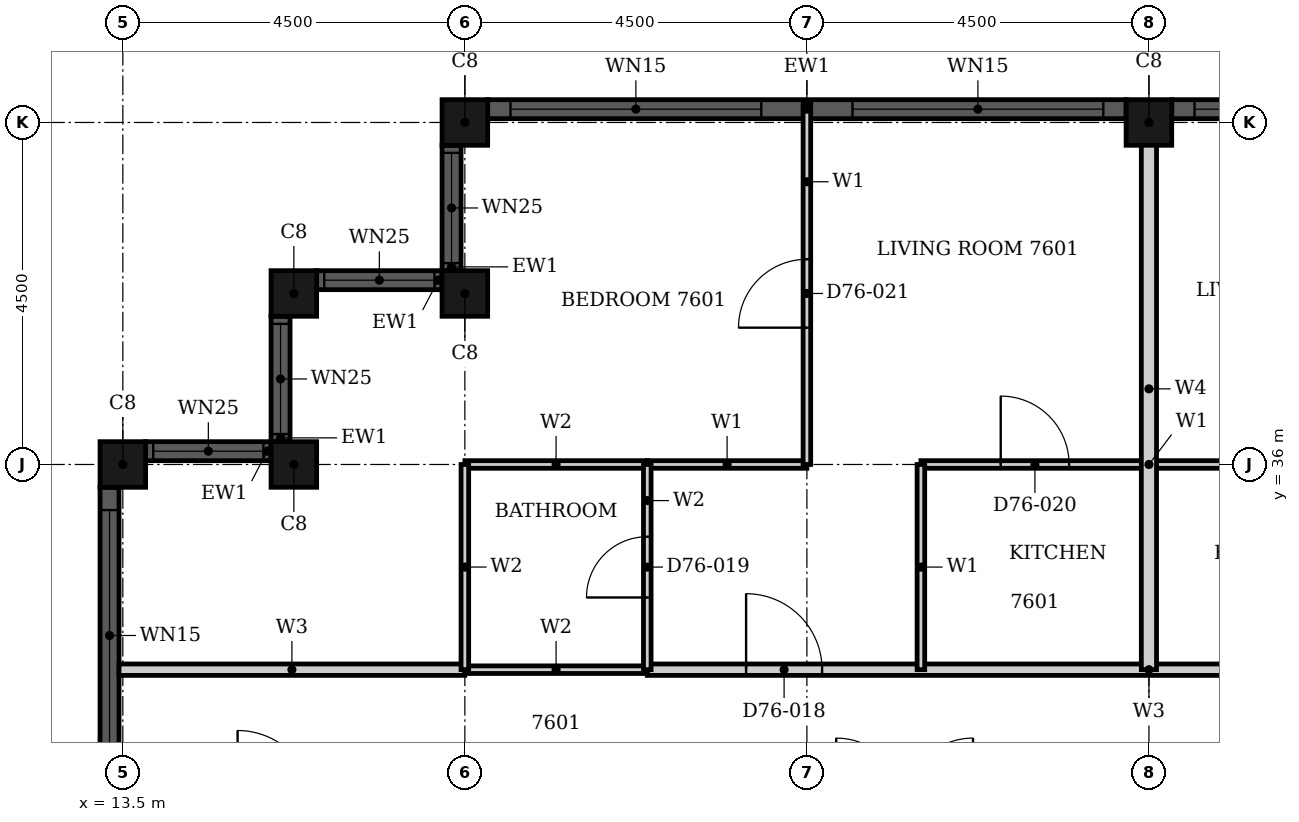
"""IFC4 building model, lengths in metres.
Left out: names, types, materials, properties, quantities, classifications, styles, units other than length and angle.
Written with IfcOpenShell. Run it as: python <this file> out.ifc"""

import sys

from ifc_helpers import new_model, si_unit, direction, frame, frame_2d, origin, origin_2d, place, context, subcontext, project, spatial, rectangle, hollow_rectangle, extrude, element, fill, save


model = new_model("IFC4")
c1 = context("Model", 3, precision=1e-05, world=origin(), true_north=direction((0.0, 1.0)))
c2 = subcontext(c1, "Body", "Model", "MODEL_VIEW")
j1 = project(units=[si_unit("LENGTHUNIT", "METRE"), si_unit("PLANEANGLEUNIT", "RADIAN")], contexts=[c1])
p1 = place(None, origin())
s1 = spatial("IfcSite", under=j1, at=p1, CompositionType="ELEMENT")
p2 = place(p1, origin())
s2 = spatial("IfcBuilding", under=s1, at=p2, CompositionType="ELEMENT")
p3 = place(p2, frame((0.0, 0.0, 298.2)))
s3 = spatial("IfcBuildingStorey", under=s2, at=p3, CompositionType="ELEMENT", Elevation=298.2)
for number, where, z_axis, x_axis in (
    (1, (27.0, 40.5, 0.0), (0.0, 0.0, 1.0), (1.0, 0.0, 0.0)),
    (2, (18.0, 40.5, 0.0), (0.0, 0.0, 1.0), (1.0, 0.0, 0.0)),
    (3, (18.0, 38.25, 0.0), (0.0, 0.0, 1.0), (1.0, 0.0, 0.0)),
    (4, (15.75, 38.25, 0.0), (0.0, 0.0, 1.0), (1.0, 0.0, 0.0)),
    (5, (15.75, 36.0, 0.0), (0.0, 0.0, 1.0), (1.0, 0.0, 0.0)),
    (6, (13.5, 36.0, 0.0), (0.0, 0.0, 1.0), (1.0, 0.0, 0.0)),
):
    element("IfcColumn", number, at=place(p3, frame(where, z_axis=z_axis, x_axis=x_axis)), inside=s3, PredefinedType="COLUMN", context=c2, shape_type="SweptSolid", body=[
        extrude(hollow_rectangle(XDim=0.6, YDim=0.6, WallThickness=0.02, at=origin_2d()), origin(), (0.0, 0.0, 1.0), 3.7),
    ])
p4 = place(p3, frame((35.7, 40.675, 0.0), z_axis=(0.0, 0.0, 1.0), x_axis=(-1.0, 0.0, 0.0)))
e7 = element("IfcWall", 7, at=p4, inside=s3, PredefinedType="SOLIDWALL", context=c2, shape_type="SweptSolid", body=[
    extrude(rectangle(XDim=8.4, YDim=0.25, at=frame_2d((4.2, 0.0))), origin(), (0.0, 0.0, 1.0), 3.7),
])
p5 = place(p4, frame((0.3, 0.0, 0.45)))
e8 = element("IfcOpeningElement", 8, at=p5, cuts=e7, PredefinedType="OPENING", context=c2, shape_type="SweptSolid", body=[
    extrude(rectangle(XDim=3.3, YDim=2.3, at=frame_2d((1.65, 1.15))), frame((0.0, 0.135, 0.0), z_axis=(0.0, -1.0, 0.0), x_axis=(1.0, 0.0, 0.0)), (0.0, 0.0, 1.0), 0.27),
])
p6 = place(p4, frame((4.8, 0.0, 0.45)))
e9 = element("IfcOpeningElement", 9, at=p6, cuts=e7, PredefinedType="OPENING", context=c2, shape_type="SweptSolid", body=[
    extrude(rectangle(XDim=3.3, YDim=2.3, at=frame_2d((1.65, 1.15))), frame((0.0, 0.135, 0.0), z_axis=(0.0, -1.0, 0.0), x_axis=(1.0, 0.0, 0.0)), (0.0, 0.0, 1.0), 0.27),
])
p7 = place(p3, frame((26.7, 40.675, 0.0), z_axis=(0.0, 0.0, 1.0), x_axis=(-1.0, 0.0, 0.0)))
e10 = element("IfcWall", 10, at=p7, inside=s3, PredefinedType="SOLIDWALL", context=c2, shape_type="SweptSolid", body=[
    extrude(rectangle(XDim=8.4, YDim=0.25, at=frame_2d((4.2, 0.0))), origin(), (0.0, 0.0, 1.0), 3.7),
])
p8 = place(p7, frame((0.3, 0.0, 0.45)))
e11 = element("IfcOpeningElement", 11, at=p8, cuts=e10, PredefinedType="OPENING", context=c2, shape_type="SweptSolid", body=[
    extrude(rectangle(XDim=3.3, YDim=2.3, at=frame_2d((1.65, 1.15))), frame((0.0, 0.135, 0.0), z_axis=(0.0, -1.0, 0.0), x_axis=(1.0, 0.0, 0.0)), (0.0, 0.0, 1.0), 0.27),
])
p9 = place(p7, frame((4.8, 0.0, 0.45)))
e12 = element("IfcOpeningElement", 12, at=p9, cuts=e10, PredefinedType="OPENING", context=c2, shape_type="SweptSolid", body=[
    extrude(rectangle(XDim=3.3, YDim=2.3, at=frame_2d((1.65, 1.15))), frame((0.0, 0.135, 0.0), z_axis=(0.0, -1.0, 0.0), x_axis=(1.0, 0.0, 0.0)), (0.0, 0.0, 1.0), 0.27),
])
p10 = place(p3, frame((17.825, 40.2, 0.0), z_axis=(0.0, 0.0, 1.0), x_axis=(0.0, -1.0, 0.0)))
e13 = element("IfcWall", 13, at=p10, inside=s3, PredefinedType="SOLIDWALL", context=c2, shape_type="SweptSolid", body=[
    extrude(rectangle(XDim=1.65, YDim=0.25, at=frame_2d((0.825, 0.0))), origin(), (0.0, 0.0, 1.0), 3.7),
])
p11 = place(p10, frame((0.1, 0.0, 0.9)))
e14 = element("IfcOpeningElement", 14, at=p11, cuts=e13, PredefinedType="OPENING", context=c2, shape_type="SweptSolid", body=[
    extrude(rectangle(XDim=1.45, YDim=1.85, at=frame_2d((0.725, 0.925))), frame((0.0, 0.135, 0.0), z_axis=(0.0, -1.0, 0.0), x_axis=(1.0, 0.0, 0.0)), (0.0, 0.0, 1.0), 0.27),
])
p12 = place(p3, frame((17.7, 38.425, 0.0), z_axis=(0.0, 0.0, 1.0), x_axis=(-1.0, 0.0, 0.0)))
e15 = element("IfcWall", 15, at=p12, inside=s3, PredefinedType="SOLIDWALL", context=c2, shape_type="SweptSolid", body=[
    extrude(rectangle(XDim=1.65, YDim=0.25, at=frame_2d((0.825, 0.0))), origin(), (0.0, 0.0, 1.0), 3.7),
])
p13 = place(p12, frame((0.1, 0.0, 0.9)))
e16 = element("IfcOpeningElement", 16, at=p13, cuts=e15, PredefinedType="OPENING", context=c2, shape_type="SweptSolid", body=[
    extrude(rectangle(XDim=1.45, YDim=1.85, at=frame_2d((0.725, 0.925))), frame((0.0, 0.135, 0.0), z_axis=(0.0, -1.0, 0.0), x_axis=(1.0, 0.0, 0.0)), (0.0, 0.0, 1.0), 0.27),
])
p14 = place(p3, frame((15.575, 37.95, 0.0), z_axis=(0.0, 0.0, 1.0), x_axis=(0.0, -1.0, 0.0)))
e17 = element("IfcWall", 17, at=p14, inside=s3, PredefinedType="SOLIDWALL", context=c2, shape_type="SweptSolid", body=[
    extrude(rectangle(XDim=1.65, YDim=0.25, at=frame_2d((0.825, 0.0))), origin(), (0.0, 0.0, 1.0), 3.7),
])
p15 = place(p14, frame((0.1, 0.0, 0.9)))
e18 = element("IfcOpeningElement", 18, at=p15, cuts=e17, PredefinedType="OPENING", context=c2, shape_type="SweptSolid", body=[
    extrude(rectangle(XDim=1.45, YDim=1.85, at=frame_2d((0.725, 0.925))), frame((0.0, 0.135, 0.0), z_axis=(0.0, -1.0, 0.0), x_axis=(1.0, 0.0, 0.0)), (0.0, 0.0, 1.0), 0.27),
])
p16 = place(p3, frame((15.45, 36.175, 0.0), z_axis=(0.0, 0.0, 1.0), x_axis=(-1.0, 0.0, 0.0)))
e19 = element("IfcWall", 19, at=p16, inside=s3, PredefinedType="SOLIDWALL", context=c2, shape_type="SweptSolid", body=[
    extrude(rectangle(XDim=1.65, YDim=0.25, at=frame_2d((0.825, 0.0))), origin(), (0.0, 0.0, 1.0), 3.7),
])
p17 = place(p16, frame((0.1, 0.0, 0.9)))
e20 = element("IfcOpeningElement", 20, at=p17, cuts=e19, PredefinedType="OPENING", context=c2, shape_type="SweptSolid", body=[
    extrude(rectangle(XDim=1.45, YDim=1.85, at=frame_2d((0.725, 0.925))), frame((0.0, 0.135, 0.0), z_axis=(0.0, -1.0, 0.0), x_axis=(1.0, 0.0, 0.0)), (0.0, 0.0, 1.0), 0.27),
])
p18 = place(p3, frame((13.325, 35.7, 0.0), z_axis=(0.0, 0.0, 1.0), x_axis=(0.0, -1.0, 0.0)))
e21 = element("IfcWall", 21, at=p18, inside=s3, PredefinedType="SOLIDWALL", context=c2, shape_type="SweptSolid", body=[
    extrude(rectangle(XDim=8.4, YDim=0.25, at=frame_2d((4.2, 0.0))), origin(), (0.0, 0.0, 1.0), 3.7),
])
p19 = place(p18, frame((0.3, 0.0, 0.45)))
e22 = element("IfcOpeningElement", 22, at=p19, cuts=e21, PredefinedType="OPENING", context=c2, shape_type="SweptSolid", body=[
    extrude(rectangle(XDim=3.3, YDim=2.3, at=frame_2d((1.65, 1.15))), frame((0.0, 0.135, 0.0), z_axis=(0.0, -1.0, 0.0), x_axis=(1.0, 0.0, 0.0)), (0.0, 0.0, 1.0), 0.27),
])
p20 = place(p18, frame((4.8, 0.0, 0.45)))
e23 = element("IfcOpeningElement", 23, at=p20, cuts=e21, PredefinedType="OPENING", context=c2, shape_type="SweptSolid", body=[
    extrude(rectangle(XDim=3.3, YDim=2.3, at=frame_2d((1.65, 1.15))), frame((0.0, 0.135, 0.0), z_axis=(0.0, -1.0, 0.0), x_axis=(1.0, 0.0, 0.0)), (0.0, 0.0, 1.0), 0.27),
])
p21 = place(p3, frame((13.45, 33.3, 0.0), z_axis=(0.0, 0.0, 1.0), x_axis=(1.0, 0.0, 0.0)))
e24 = element("IfcWall", 24, at=p21, inside=s3, PredefinedType="PARTITIONING", context=c2, shape_type="SweptSolid", body=[
    extrude(rectangle(XDim=4.549, YDim=0.15, at=frame_2d((2.274, 0.0))), origin(), (0.0, 0.0, 1.0), 3.4),
])
p22 = place(p3, frame((20.4, 33.3, 0.0), z_axis=(0.0, 0.0, 1.0), x_axis=(1.0, 0.0, 0.0)))
e25 = element("IfcWall", 25, at=p22, inside=s3, PredefinedType="PARTITIONING", context=c2, shape_type="SweptSolid", body=[
    extrude(rectangle(XDim=13.2, YDim=0.15, at=frame_2d((6.6, 0.0))), origin(), (0.0, 0.0, 1.0), 3.4),
])
p23 = place(p22, frame((1.3, 0.0, 0.0)))
e26 = element("IfcOpeningElement", 26, at=p23, cuts=e25, PredefinedType="OPENING", context=c2, shape_type="SweptSolid", body=[
    extrude(rectangle(XDim=1.0, YDim=2.2, at=frame_2d((0.5, 1.1))), frame((0.0, 0.085, 0.0), z_axis=(0.0, -1.0, 0.0), x_axis=(1.0, 0.0, 0.0)), (0.0, 0.0, 1.0), 0.17),
])
p24 = place(p22, frame((10.9, 0.0, 0.0)))
e27 = element("IfcOpeningElement", 27, at=p24, cuts=e25, PredefinedType="OPENING", context=c2, shape_type="SweptSolid", body=[
    extrude(rectangle(XDim=1.0, YDim=2.2, at=frame_2d((0.5, 1.1))), frame((0.0, 0.085, 0.0), z_axis=(0.0, -1.0, 0.0), x_axis=(1.0, 0.0, 0.0)), (0.0, 0.0, 1.0), 0.17),
])
p25 = place(p3, frame((20.4, 36.0, 0.0), z_axis=(0.0, 0.0, 1.0), x_axis=(1.0, 0.0, 0.0)))
e28 = element("IfcWall", 28, at=p25, inside=s3, PredefinedType="PARTITIONING", context=c2, shape_type="SweptSolid", body=[
    extrude(rectangle(XDim=2.1, YDim=0.1, at=frame_2d((1.05, 0.0))), origin(), (0.0, 0.0, 1.0), 3.4),
])
p26 = place(p3, frame((24.0, 36.0, 0.0), z_axis=(0.0, 0.0, 1.0), x_axis=(1.0, 0.0, 0.0)))
e29 = element("IfcWall", 29, at=p26, inside=s3, PredefinedType="PARTITIONING", context=c2, shape_type="SweptSolid", body=[
    extrude(rectangle(XDim=6.0, YDim=0.1, at=frame_2d((3.0, 0.0))), origin(), (0.0, 0.0, 1.0), 3.4),
])
p27 = place(p26, frame((1.05, 0.0, 0.0)))
e30 = element("IfcOpeningElement", 30, at=p27, cuts=e29, PredefinedType="OPENING", context=c2, shape_type="SweptSolid", body=[
    extrude(rectangle(XDim=0.9, YDim=2.1, at=frame_2d((0.45, 1.05))), frame((0.0, 0.06, 0.0), z_axis=(0.0, -1.0, 0.0), x_axis=(1.0, 0.0, 0.0)), (0.0, 0.0, 1.0), 0.12),
])
p28 = place(p26, frame((4.05, 0.0, 0.0)))
e31 = element("IfcOpeningElement", 31, at=p28, cuts=e29, PredefinedType="OPENING", context=c2, shape_type="SweptSolid", body=[
    extrude(rectangle(XDim=0.9, YDim=2.1, at=frame_2d((0.45, 1.05))), frame((0.0, 0.06, 0.0), z_axis=(0.0, -1.0, 0.0), x_axis=(1.0, 0.0, 0.0)), (0.0, 0.0, 1.0), 0.12),
])
p29 = place(p3, frame((22.5, 36.0, 0.0), z_axis=(0.0, 0.0, 1.0), x_axis=(0.0, 1.0, 0.0)))
e32 = element("IfcWall", 32, at=p29, inside=s3, PredefinedType="PARTITIONING", context=c2, shape_type="SweptSolid", body=[
    extrude(rectangle(XDim=4.74, YDim=0.1, at=frame_2d((2.37, 0.0))), origin(), (0.0, 0.0, 1.0), 3.4),
])
p30 = place(p29, frame((1.8, 0.0, 0.0)))
e33 = element("IfcOpeningElement", 33, at=p30, cuts=e32, PredefinedType="OPENING", context=c2, shape_type="SweptSolid", body=[
    extrude(rectangle(XDim=0.9, YDim=2.1, at=frame_2d((0.45, 1.05))), frame((0.0, 0.06, 0.0), z_axis=(0.0, -1.0, 0.0), x_axis=(1.0, 0.0, 0.0)), (0.0, 0.0, 1.0), 0.12),
])
p31 = place(p3, frame((24.0, 33.3, 0.0), z_axis=(0.0, 0.0, 1.0), x_axis=(0.0, 1.0, 0.0)))
e34 = element("IfcWall", 34, at=p31, inside=s3, PredefinedType="PARTITIONING", context=c2, shape_type="SweptSolid", body=[
    extrude(rectangle(XDim=2.7, YDim=0.1, at=frame_2d((1.35, 0.0))), origin(), (0.0, 0.0, 1.0), 3.4),
])
p32 = place(p3, frame((27.0, 33.3, 0.0), z_axis=(0.0, 0.0, 1.0), x_axis=(0.0, 1.0, 0.0)))
e35 = element("IfcWall", 35, at=p32, inside=s3, PredefinedType="PARTITIONING", context=c2, shape_type="SweptSolid", body=[
    extrude(rectangle(XDim=7.39, YDim=0.2, at=frame_2d((3.695, 0.0))), origin(), (0.0, 0.0, 1.0), 3.4),
])
for number, where, z_axis, x_axis in (
    (36, (18.0, 33.3, 0.0), (0.0, 0.0, 1.0), (1.0, 0.0, 0.0)),
    (37, (18.0, 36.0, 0.0), (0.0, 0.0, 1.0), (1.0, 0.0, 0.0)),
):
    element("IfcWall", number, at=place(p3, frame(where, z_axis=z_axis, x_axis=x_axis)), inside=s3, PredefinedType="PARTITIONING", context=c2, shape_type="SweptSolid", body=[
        extrude(rectangle(XDim=2.4, YDim=0.1, at=frame_2d((1.2, 0.0))), origin(), (0.0, 0.0, 1.0), 3.4),
    ])
p33 = place(p3, frame((18.0, 33.301, 0.0), z_axis=(0.0, 0.0, 1.0), x_axis=(0.0, 1.0, 0.0)))
e38 = element("IfcWall", 38, at=p33, inside=s3, PredefinedType="PARTITIONING", context=c2, shape_type="SweptSolid", body=[
    extrude(rectangle(XDim=2.699, YDim=0.1, at=frame_2d((1.35, 0.0))), origin(), (0.0, 0.0, 1.0), 3.4),
])
p34 = place(p3, frame((20.4, 33.3, 0.0), z_axis=(0.0, 0.0, 1.0), x_axis=(0.0, 1.0, 0.0)))
e39 = element("IfcWall", 39, at=p34, inside=s3, PredefinedType="PARTITIONING", context=c2, shape_type="SweptSolid", body=[
    extrude(rectangle(XDim=2.7, YDim=0.1, at=frame_2d((1.35, 0.0))), origin(), (0.0, 0.0, 1.0), 3.4),
])
p35 = place(p34, frame((0.95, 0.0, 0.0)))
e40 = element("IfcOpeningElement", 40, at=p35, cuts=e39, PredefinedType="OPENING", context=c2, shape_type="SweptSolid", body=[
    extrude(rectangle(XDim=0.8, YDim=2.1, at=frame_2d((0.4, 1.05))), frame((0.0, 0.06, 0.0), z_axis=(0.0, -1.0, 0.0), x_axis=(1.0, 0.0, 0.0)), (0.0, 0.0, 1.0), 0.12),
])
p36 = place(p6, origin())
e41 = element("IfcWindow", 41, at=p36, inside=s3, PartitioningType="SINGLE_PANEL", PredefinedType="WINDOW", context=c2, shape_type="SweptSolid", body=[
    extrude(rectangle(XDim=3.3, YDim=2.3, at=frame_2d((1.65, 1.15))), frame((0.0, 0.03, 0.0), z_axis=(0.0, -1.0, 0.0), x_axis=(1.0, 0.0, 0.0)), (0.0, 0.0, 1.0), 0.06),
])
fill(e9, e41)
p37 = place(p8, origin())
e42 = element("IfcWindow", 42, at=p37, inside=s3, PartitioningType="SINGLE_PANEL", PredefinedType="WINDOW", context=c2, shape_type="SweptSolid", body=[
    extrude(rectangle(XDim=3.3, YDim=2.3, at=frame_2d((1.65, 1.15))), frame((0.0, 0.03, 0.0), z_axis=(0.0, -1.0, 0.0), x_axis=(1.0, 0.0, 0.0)), (0.0, 0.0, 1.0), 0.06),
])
fill(e11, e42)
p38 = place(p9, origin())
e43 = element("IfcWindow", 43, at=p38, inside=s3, PartitioningType="SINGLE_PANEL", PredefinedType="WINDOW", context=c2, shape_type="SweptSolid", body=[
    extrude(rectangle(XDim=3.3, YDim=2.3, at=frame_2d((1.65, 1.15))), frame((0.0, 0.03, 0.0), z_axis=(0.0, -1.0, 0.0), x_axis=(1.0, 0.0, 0.0)), (0.0, 0.0, 1.0), 0.06),
])
fill(e12, e43)
p39 = place(p11, origin())
e44 = element("IfcWindow", 44, at=p39, inside=s3, PartitioningType="SINGLE_PANEL", PredefinedType="WINDOW", context=c2, shape_type="SweptSolid", body=[
    extrude(rectangle(XDim=1.45, YDim=1.85, at=frame_2d((0.725, 0.925))), frame((0.0, 0.03, 0.0), z_axis=(0.0, -1.0, 0.0), x_axis=(1.0, 0.0, 0.0)), (0.0, 0.0, 1.0), 0.06),
])
fill(e14, e44)
p40 = place(p13, origin())
e45 = element("IfcWindow", 45, at=p40, inside=s3, PartitioningType="SINGLE_PANEL", PredefinedType="WINDOW", context=c2, shape_type="SweptSolid", body=[
    extrude(rectangle(XDim=1.45, YDim=1.85, at=frame_2d((0.725, 0.925))), frame((0.0, 0.03, 0.0), z_axis=(0.0, -1.0, 0.0), x_axis=(1.0, 0.0, 0.0)), (0.0, 0.0, 1.0), 0.06),
])
fill(e16, e45)
p41 = place(p15, origin())
e46 = element("IfcWindow", 46, at=p41, inside=s3, PartitioningType="SINGLE_PANEL", PredefinedType="WINDOW", context=c2, shape_type="SweptSolid", body=[
    extrude(rectangle(XDim=1.45, YDim=1.85, at=frame_2d((0.725, 0.925))), frame((0.0, 0.03, 0.0), z_axis=(0.0, -1.0, 0.0), x_axis=(1.0, 0.0, 0.0)), (0.0, 0.0, 1.0), 0.06),
])
fill(e18, e46)
p42 = place(p17, origin())
e47 = element("IfcWindow", 47, at=p42, inside=s3, PartitioningType="SINGLE_PANEL", PredefinedType="WINDOW", context=c2, shape_type="SweptSolid", body=[
    extrude(rectangle(XDim=1.45, YDim=1.85, at=frame_2d((0.725, 0.925))), frame((0.0, 0.03, 0.0), z_axis=(0.0, -1.0, 0.0), x_axis=(1.0, 0.0, 0.0)), (0.0, 0.0, 1.0), 0.06),
])
fill(e20, e47)
p43 = place(p19, origin())
e48 = element("IfcWindow", 48, at=p43, inside=s3, PartitioningType="SINGLE_PANEL", PredefinedType="WINDOW", context=c2, shape_type="SweptSolid", body=[
    extrude(rectangle(XDim=3.3, YDim=2.3, at=frame_2d((1.65, 1.15))), frame((0.0, 0.03, 0.0), z_axis=(0.0, -1.0, 0.0), x_axis=(1.0, 0.0, 0.0)), (0.0, 0.0, 1.0), 0.06),
])
fill(e22, e48)
p44 = place(p23, origin())
e49 = element("IfcDoor", 49, at=p44, inside=s3, OperationType="SINGLE_SWING_RIGHT", PredefinedType="DOOR", context=c2, shape_type="SweptSolid", body=[
    extrude(rectangle(XDim=1.0, YDim=2.2, at=frame_2d((0.5, 1.1))), frame((0.0, 0.025, 0.0), z_axis=(0.0, -1.0, 0.0), x_axis=(1.0, 0.0, 0.0)), (0.0, 0.0, 1.0), 0.05),
])
fill(e26, e49)
p45 = place(p35, origin())
e50 = element("IfcDoor", 50, at=p45, inside=s3, OperationType="SINGLE_SWING_LEFT", PredefinedType="DOOR", context=c2, shape_type="SweptSolid", body=[
    extrude(rectangle(XDim=0.8, YDim=2.1, at=frame_2d((0.4, 1.05))), frame((0.0, 0.025, 0.0), z_axis=(0.0, -1.0, 0.0), x_axis=(1.0, 0.0, 0.0)), (0.0, 0.0, 1.0), 0.05),
])
fill(e40, e50)
p46 = place(p27, origin())
e51 = element("IfcDoor", 51, at=p46, inside=s3, OperationType="SINGLE_SWING_LEFT", PredefinedType="DOOR", context=c2, shape_type="SweptSolid", body=[
    extrude(rectangle(XDim=0.9, YDim=2.1, at=frame_2d((0.45, 1.05))), frame((0.0, 0.025, 0.0), z_axis=(0.0, -1.0, 0.0), x_axis=(1.0, 0.0, 0.0)), (0.0, 0.0, 1.0), 0.05),
])
fill(e30, e51)
p47 = place(p30, origin())
e52 = element("IfcDoor", 52, at=p47, inside=s3, OperationType="SINGLE_SWING_RIGHT", PredefinedType="DOOR", context=c2, shape_type="SweptSolid", body=[
    extrude(rectangle(XDim=0.9, YDim=2.1, at=frame_2d((0.45, 1.05))), frame((0.0, 0.025, 0.0), z_axis=(0.0, -1.0, 0.0), x_axis=(1.0, 0.0, 0.0)), (0.0, 0.0, 1.0), 0.05),
])
fill(e33, e52)
save(model, sys.argv[1])
